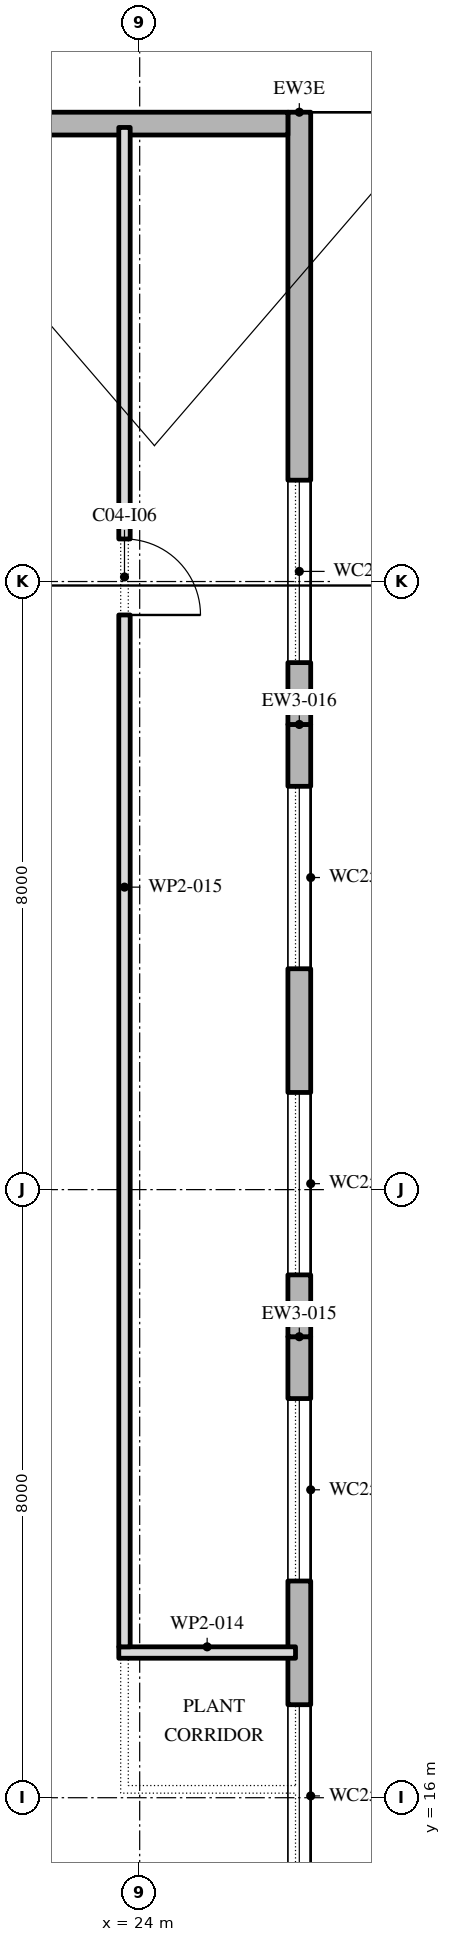
"""IFC4 building model, lengths in metres.
Left out: names, types, materials, properties, quantities, classifications, styles, units other than length and angle.
Written with IfcOpenShell. Run it as: python <this file> out.ifc"""

import sys

from ifc_helpers import new_model, si_unit, direction, frame, frame_2d, origin, place, context, subcontext, project, spatial, polyline, rectangle, outline, extrude, element, fill, save


model = new_model("IFC4")
c1 = context("Model", 3, precision=1e-05, world=origin(), true_north=direction((0.0, 1.0)))
c2 = subcontext(c1, "Body", "Model", "MODEL_VIEW")
j1 = project(units=[si_unit("LENGTHUNIT", "METRE"), si_unit("PLANEANGLEUNIT", "RADIAN")], contexts=[c1])
p1 = place(None, origin())
s1 = spatial("IfcSite", under=j1, at=p1, CompositionType="ELEMENT")
p2 = place(p1, origin())
s2 = spatial("IfcBuilding", under=s1, at=p2, CompositionType="ELEMENT")
p3 = place(p2, frame((0.0, 0.0, 381.6)))
s3 = spatial("IfcBuildingStorey", under=s2, at=p3, CompositionType="ELEMENT", Elevation=381.6)
p4 = place(p3, frame((26.1, 14.01, 0.0), z_axis=(0.0, 0.0, 1.0), x_axis=(0.0, 1.0, 0.0)))
e1 = element("IfcWall", 1, at=p4, inside=s3, PredefinedType="STANDARD", context=c2, shape_type="SweptSolid", body=[
    extrude(rectangle(XDim=8.055, YDim=0.3, at=frame_2d((4.027, 0.0))), origin(), (0.0, 0.0, 1.0), 4.0),
])
p5 = place(p4, frame((0.814, 0.0, 0.8)))
e2 = element("IfcOpeningElement", 2, at=p5, cuts=e1, PredefinedType="OPENING", context=c2, shape_type="SweptSolid", body=[
    extrude(outline(polyline([(0.0, 0.0), (2.4, 0.0), (2.4, 1.25), (2.377, 1.488), (2.31, 1.717), (2.2, 1.929), (2.051, 2.116), (1.87, 2.272), (1.663, 2.391), (1.437, 2.468), (1.2, 2.5), (0.963, 2.468), (0.737, 2.391), (0.53, 2.272), (0.349, 2.116), (0.2, 1.929), (0.09, 1.717), (0.023, 1.488), (0.0, 1.25), (0.0, 0.0)])), frame((0.0, 0.16, 0.0), z_axis=(0.0, -1.0, 0.0), x_axis=(1.0, 0.0, 0.0)), (0.0, 0.0, 1.0), 0.32),
])
p6 = place(p4, frame((4.841, 0.0, 0.8)))
e3 = element("IfcOpeningElement", 3, at=p6, cuts=e1, PredefinedType="OPENING", context=c2, shape_type="SweptSolid", body=[
    extrude(outline(polyline([(0.0, 0.0), (2.4, 0.0), (2.4, 1.25), (2.377, 1.488), (2.31, 1.717), (2.2, 1.929), (2.051, 2.116), (1.87, 2.272), (1.663, 2.391), (1.437, 2.468), (1.2, 2.5), (0.963, 2.468), (0.737, 2.391), (0.53, 2.272), (0.349, 2.116), (0.2, 1.929), (0.09, 1.717), (0.023, 1.488), (0.0, 1.25), (0.0, 0.0)])), frame((0.0, 0.16, 0.0), z_axis=(0.0, -1.0, 0.0), x_axis=(1.0, 0.0, 0.0)), (0.0, 0.0, 1.0), 0.32),
])
p7 = place(p3, frame((26.1, 22.065, 0.0), z_axis=(0.0, 0.0, 1.0), x_axis=(0.0, 1.0, 0.0)))
e4 = element("IfcWall", 4, at=p7, inside=s3, PredefinedType="STANDARD", context=c2, shape_type="SweptSolid", body=[
    extrude(rectangle(XDim=8.055, YDim=0.3, at=frame_2d((4.027, 0.0))), origin(), (0.0, 0.0, 1.0), 4.0),
])
p8 = place(p7, frame((0.814, 0.0, 0.8)))
e5 = element("IfcOpeningElement", 5, at=p8, cuts=e4, PredefinedType="OPENING", context=c2, shape_type="SweptSolid", body=[
    extrude(outline(polyline([(0.0, 0.0), (2.4, 0.0), (2.4, 1.25), (2.377, 1.488), (2.31, 1.717), (2.2, 1.929), (2.051, 2.116), (1.87, 2.272), (1.663, 2.391), (1.437, 2.468), (1.2, 2.5), (0.963, 2.468), (0.737, 2.391), (0.53, 2.272), (0.349, 2.116), (0.2, 1.929), (0.09, 1.717), (0.023, 1.488), (0.0, 1.25), (0.0, 0.0)])), frame((0.0, 0.16, 0.0), z_axis=(0.0, -1.0, 0.0), x_axis=(1.0, 0.0, 0.0)), (0.0, 0.0, 1.0), 0.32),
])
p9 = place(p7, frame((4.841, 0.0, 0.8)))
e6 = element("IfcOpeningElement", 6, at=p9, cuts=e4, PredefinedType="OPENING", context=c2, shape_type="SweptSolid", body=[
    extrude(outline(polyline([(0.0, 0.0), (2.4, 0.0), (2.4, 1.25), (2.377, 1.488), (2.31, 1.717), (2.2, 1.929), (2.051, 2.116), (1.87, 2.272), (1.663, 2.391), (1.437, 2.468), (1.2, 2.5), (0.963, 2.468), (0.737, 2.391), (0.53, 2.272), (0.349, 2.116), (0.2, 1.929), (0.09, 1.717), (0.023, 1.488), (0.0, 1.25), (0.0, 0.0)])), frame((0.0, 0.16, 0.0), z_axis=(0.0, -1.0, 0.0), x_axis=(1.0, 0.0, 0.0)), (0.0, 0.0, 1.0), 0.32),
])
p10 = place(p3, frame((26.1, 30.119, 0.0), z_axis=(0.0, 0.0, 1.0), x_axis=(0.0, 1.0, 0.0)))
e7 = element("IfcWall", 7, at=p10, inside=s3, PredefinedType="STANDARD", context=c2, shape_type="SweptSolid", body=[
    extrude(outline(polyline([(0.0, 0.0), (8.055, 0.0), (8.055, 2.098), (5.236, 4.0), (1.848, 6.285), (1.828, 6.298), (1.828, 4.0), (0.0, 4.0), (0.0, 0.0)])), frame((0.0, 0.15, 0.0), z_axis=(0.0, -1.0, 0.0), x_axis=(1.0, 0.0, 0.0)), (0.0, 0.0, 1.0), 0.3),
])
p11 = place(p10, frame((0.814, 0.0, 0.8)))
e8 = element("IfcOpeningElement", 8, at=p11, cuts=e7, PredefinedType="OPENING", context=c2, shape_type="SweptSolid", body=[
    extrude(outline(polyline([(0.0, 0.0), (2.4, 0.0), (2.4, 0.85), (2.377, 1.088), (2.31, 1.317), (2.2, 1.529), (2.051, 1.717), (1.87, 1.872), (1.663, 1.991), (1.437, 2.068), (1.2, 2.1), (0.963, 2.068), (0.737, 1.991), (0.53, 1.872), (0.349, 1.717), (0.2, 1.529), (0.09, 1.317), (0.023, 1.088), (0.0, 0.85), (0.0, 0.0)])), frame((0.0, 0.16, 0.0), z_axis=(0.0, -1.0, 0.0), x_axis=(1.0, 0.0, 0.0)), (0.0, 0.0, 1.0), 0.32),
])
p12 = place(p3, frame((25.95, 38.024, 0.0), z_axis=(0.0, 0.0, 1.0), x_axis=(-1.0, 0.0, 0.0)))
e9 = element("IfcWall", 9, at=p12, inside=s3, PredefinedType="STANDARD", context=c2, shape_type="SweptSolid", body=[
    extrude(rectangle(XDim=8.7, YDim=0.3, at=frame_2d((4.35, 0.0))), origin(), (0.0, 0.0, 1.0), 2.199),
])
p13 = place(p3, frame((23.725, 17.91, 0.0), z_axis=(0.0, 0.0, 1.0), x_axis=(1.0, 0.0, 0.0)))
e10 = element("IfcWall", 10, at=p13, inside=s3, PredefinedType="PARTITIONING", context=c2, shape_type="SweptSolid", body=[
    extrude(rectangle(XDim=2.325, YDim=0.15, at=frame_2d((1.163, 0.0))), origin(), (0.0, 0.0, 1.0), 4.0),
])
p14 = place(p3, frame((23.8, 37.974, 0.0), z_axis=(0.0, 0.0, 1.0), x_axis=(0.0, -1.0, 0.0)))
e11 = element("IfcWall", 11, at=p14, inside=s3, PredefinedType="PARTITIONING", context=c2, shape_type="SweptSolid", body=[
    extrude(rectangle(XDim=19.989, YDim=0.15, at=frame_2d((9.995, 0.0))), origin(), (0.0, 0.0, 1.0), 4.0),
])
p15 = place(p14, frame((5.414, 0.0, 0.0)))
e12 = element("IfcOpeningElement", 12, at=p15, cuts=e11, PredefinedType="OPENING", context=c2, shape_type="SweptSolid", body=[
    extrude(rectangle(XDim=1.0, YDim=2.1, at=frame_2d((0.5, 1.05))), frame((0.0, 0.085, 0.0), z_axis=(0.0, -1.0, 0.0), x_axis=(1.0, 0.0, 0.0)), (0.0, 0.0, 1.0), 0.17),
])
p16 = place(p5, origin())
e13 = element("IfcWindow", 13, at=p16, inside=s3, PartitioningType="DOUBLE_PANEL_VERTICAL", PredefinedType="WINDOW", context=c2, shape_type="SweptSolid", body=[
    extrude(outline(polyline([(0.0, 0.0), (2.4, 0.0), (2.4, 1.25), (2.377, 1.488), (2.31, 1.717), (2.2, 1.929), (2.051, 2.116), (1.87, 2.272), (1.663, 2.391), (1.437, 2.468), (1.2, 2.5), (0.963, 2.468), (0.737, 2.391), (0.53, 2.272), (0.349, 2.116), (0.2, 1.929), (0.09, 1.717), (0.023, 1.488), (0.0, 1.25), (0.0, 0.0)])), frame((0.0, 0.03, 0.0), z_axis=(0.0, -1.0, 0.0), x_axis=(1.0, 0.0, 0.0)), (0.0, 0.0, 1.0), 0.06),
])
fill(e2, e13)
p17 = place(p6, origin())
e14 = element("IfcWindow", 14, at=p17, inside=s3, PartitioningType="DOUBLE_PANEL_VERTICAL", PredefinedType="WINDOW", context=c2, shape_type="SweptSolid", body=[
    extrude(outline(polyline([(0.0, 0.0), (2.4, 0.0), (2.4, 1.25), (2.377, 1.488), (2.31, 1.717), (2.2, 1.929), (2.051, 2.116), (1.87, 2.272), (1.663, 2.391), (1.437, 2.468), (1.2, 2.5), (0.963, 2.468), (0.737, 2.391), (0.53, 2.272), (0.349, 2.116), (0.2, 1.929), (0.09, 1.717), (0.023, 1.488), (0.0, 1.25), (0.0, 0.0)])), frame((0.0, 0.03, 0.0), z_axis=(0.0, -1.0, 0.0), x_axis=(1.0, 0.0, 0.0)), (0.0, 0.0, 1.0), 0.06),
])
fill(e3, e14)
p18 = place(p8, origin())
e15 = element("IfcWindow", 15, at=p18, inside=s3, PartitioningType="DOUBLE_PANEL_VERTICAL", PredefinedType="WINDOW", context=c2, shape_type="SweptSolid", body=[
    extrude(outline(polyline([(0.0, 0.0), (2.4, 0.0), (2.4, 1.25), (2.377, 1.488), (2.31, 1.717), (2.2, 1.929), (2.051, 2.116), (1.87, 2.272), (1.663, 2.391), (1.437, 2.468), (1.2, 2.5), (0.963, 2.468), (0.737, 2.391), (0.53, 2.272), (0.349, 2.116), (0.2, 1.929), (0.09, 1.717), (0.023, 1.488), (0.0, 1.25), (0.0, 0.0)])), frame((0.0, 0.03, 0.0), z_axis=(0.0, -1.0, 0.0), x_axis=(1.0, 0.0, 0.0)), (0.0, 0.0, 1.0), 0.06),
])
fill(e5, e15)
p19 = place(p9, origin())
e16 = element("IfcWindow", 16, at=p19, inside=s3, PartitioningType="DOUBLE_PANEL_VERTICAL", PredefinedType="WINDOW", context=c2, shape_type="SweptSolid", body=[
    extrude(outline(polyline([(0.0, 0.0), (2.4, 0.0), (2.4, 1.25), (2.377, 1.488), (2.31, 1.717), (2.2, 1.929), (2.051, 2.116), (1.87, 2.272), (1.663, 2.391), (1.437, 2.468), (1.2, 2.5), (0.963, 2.468), (0.737, 2.391), (0.53, 2.272), (0.349, 2.116), (0.2, 1.929), (0.09, 1.717), (0.023, 1.488), (0.0, 1.25), (0.0, 0.0)])), frame((0.0, 0.03, 0.0), z_axis=(0.0, -1.0, 0.0), x_axis=(1.0, 0.0, 0.0)), (0.0, 0.0, 1.0), 0.06),
])
fill(e6, e16)
p20 = place(p11, origin())
e17 = element("IfcWindow", 17, at=p20, inside=s3, PartitioningType="DOUBLE_PANEL_VERTICAL", PredefinedType="WINDOW", context=c2, shape_type="SweptSolid", body=[
    extrude(outline(polyline([(0.0, 0.0), (2.4, 0.0), (2.4, 0.85), (2.377, 1.088), (2.31, 1.317), (2.2, 1.529), (2.051, 1.717), (1.87, 1.872), (1.663, 1.991), (1.437, 2.068), (1.2, 2.1), (0.963, 2.068), (0.737, 1.991), (0.53, 1.872), (0.349, 1.717), (0.2, 1.529), (0.09, 1.317), (0.023, 1.088), (0.0, 0.85), (0.0, 0.0)])), frame((0.0, 0.03, 0.0), z_axis=(0.0, -1.0, 0.0), x_axis=(1.0, 0.0, 0.0)), (0.0, 0.0, 1.0), 0.06),
])
fill(e8, e17)
p21 = place(p15, origin())
e18 = element("IfcDoor", 18, at=p21, inside=s3, OperationType="SINGLE_SWING_LEFT", PredefinedType="DOOR", context=c2, shape_type="SweptSolid", body=[
    extrude(rectangle(XDim=1.0, YDim=2.1, at=frame_2d((0.5, 1.05))), frame((0.0, 0.025, 0.0), z_axis=(0.0, -1.0, 0.0), x_axis=(1.0, 0.0, 0.0)), (0.0, 0.0, 1.0), 0.05),
])
fill(e12, e18)
save(model, sys.argv[1])
